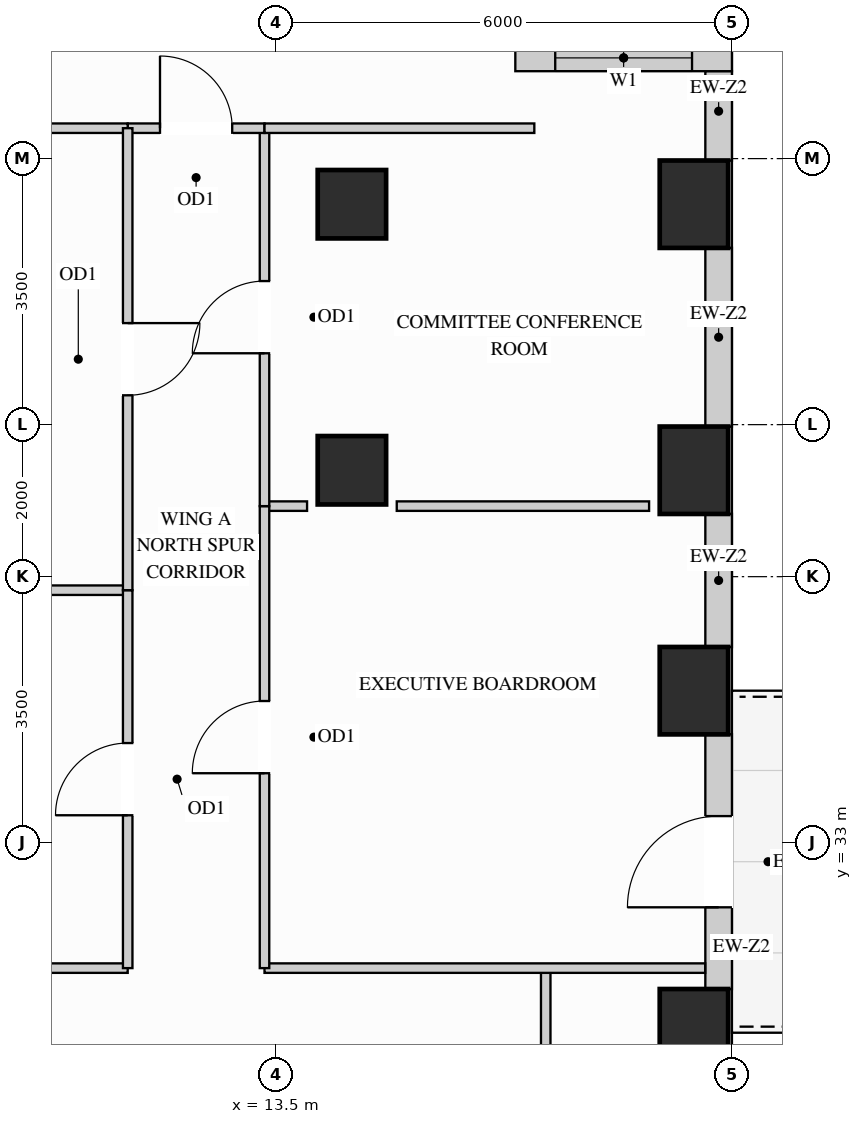
"""IFC4 building model, lengths in metres.
Left out: names, types, materials, properties, quantities, classifications, styles, units other than length and angle.
Written with IfcOpenShell. Run it as: python <this file> out.ifc"""

import sys

from ifc_helpers import new_model, si_unit, direction, frame, frame_2d, origin, origin_2d, place, context, subcontext, project, spatial, rectangle, extrude, source, transform, mapped, element, fill, save


model = new_model("IFC4")
c1 = context("Model", 3, precision=1e-05, world=origin(), true_north=direction((0.0, 1.0)))
c2 = subcontext(c1, "Body", "Model", "MODEL_VIEW")
j1 = project(units=[si_unit("LENGTHUNIT", "METRE"), si_unit("PLANEANGLEUNIT", "RADIAN")], contexts=[c1])
p1 = place(None, origin())
s1 = spatial("IfcSite", under=j1, at=p1, CompositionType="ELEMENT")
p2 = place(p1, origin())
s2 = spatial("IfcBuilding", under=s1, at=p2, CompositionType="ELEMENT")
p3 = place(p2, frame((0.0, 0.0, 113.4)))
s3 = spatial("IfcBuildingStorey", under=s2, at=p3, CompositionType="ELEMENT", Elevation=113.4)
m1 = source(origin(), c2, "Body", "SweptSolid", [
    extrude(rectangle(XDim=0.9, YDim=0.9, at=origin_2d()), origin(), (0.0, 0.0, 1.0), 3.38),
])
for number, where, z_axis, x_axis in (
    (1, (14.5, 37.9, 0.0), (0.0, 0.0, 1.0), (1.0, 0.0, 0.0)),
    (2, (14.5, 41.4, 0.0), (0.0, 0.0, 1.0), (1.0, 0.0, 0.0)),
):
    element("IfcColumn", number, at=place(p3, frame(where, z_axis=z_axis, x_axis=x_axis)), inside=s3, PredefinedType="COLUMN", context=c2, shape_type="MappedRepresentation", body=[
        mapped(m1, transform((0.0, 0.0, 0.0), x_axis=(1.0, 0.0, 0.0), y_axis=(0.0, 1.0, 0.0), z_axis=(0.0, 0.0, 1.0))),
    ])
m2 = source(origin(), c2, "Body", "SweptSolid", [
    extrude(rectangle(XDim=0.9, YDim=1.15, at=origin_2d()), origin(), (0.0, 0.0, 1.0), 3.38),
])
for number, where, z_axis, x_axis in (
    (3, (19.0, 30.5, 0.0), (0.0, 0.0, 1.0), (1.0, 0.0, 0.0)),
    (4, (19.0, 35.0, 0.0), (0.0, 0.0, 1.0), (1.0, 0.0, 0.0)),
    (5, (19.0, 37.9, 0.0), (0.0, 0.0, 1.0), (1.0, 0.0, 0.0)),
    (6, (19.0, 41.4, 0.0), (0.0, 0.0, 1.0), (1.0, 0.0, 0.0)),
):
    element("IfcColumn", number, at=place(p3, frame(where, z_axis=z_axis, x_axis=x_axis)), inside=s3, PredefinedType="COLUMN", context=c2, shape_type="MappedRepresentation", body=[
        mapped(m2, transform((0.0, 0.0, 0.0), x_axis=(1.0, 0.0, 0.0), y_axis=(0.0, 1.0, 0.0), z_axis=(0.0, 0.0, 1.0))),
    ])
p4 = place(p3, frame((19.325, 31.073, 0.0), z_axis=(0.0, 0.0, 1.0), x_axis=(0.0, 1.0, 0.0)))
e7 = element("IfcWall", 7, at=p4, inside=s3, PredefinedType="SOLIDWALL", context=c2, shape_type="SweptSolid", body=[
    extrude(rectangle(XDim=3.354, YDim=0.35, at=frame_2d((1.677, 0.0))), origin(), (0.0, 0.0, 1.0), 2.519),
])
p5 = place(p4, frame((1.077, 0.0, 0.0)))
e8 = element("IfcOpeningElement", 8, at=p5, cuts=e7, PredefinedType="OPENING", context=c2, shape_type="SweptSolid", body=[
    extrude(rectangle(XDim=1.2, YDim=2.15, at=frame_2d((0.6, 1.075))), frame((0.0, 0.185, 0.0), z_axis=(0.0, -1.0, 0.0), x_axis=(1.0, 0.0, 0.0)), (0.0, 0.0, 1.0), 0.37),
])
m3 = source(origin(), c2, "Body", "SweptSolid", [
    extrude(rectangle(XDim=1.754, YDim=0.35, at=frame_2d((0.877, 0.0))), origin(), (0.0, 0.0, 1.0), 2.519),
])
p6 = place(p3, frame((19.325, 35.573, 0.0), z_axis=(0.0, 0.0, 1.0), x_axis=(0.0, 1.0, 0.0)))
e9 = element("IfcWall", 9, at=p6, inside=s3, PredefinedType="SOLIDWALL", context=c2, shape_type="MappedRepresentation", body=[
    mapped(m3, transform((0.0, 0.0, 0.0), x_axis=(1.0, 0.0, 0.0), y_axis=(0.0, 1.0, 0.0), z_axis=(0.0, 0.0, 1.0))),
])
m4 = source(origin(), c2, "Body", "SweptSolid", [
    extrude(rectangle(XDim=2.354, YDim=0.35, at=frame_2d((1.177, 0.0))), origin(), (0.0, 0.0, 1.0), 2.519),
])
p7 = place(p3, frame((19.325, 38.473, 0.0), z_axis=(0.0, 0.0, 1.0), x_axis=(0.0, 1.0, 0.0)))
e10 = element("IfcWall", 10, at=p7, inside=s3, PredefinedType="SOLIDWALL", context=c2, shape_type="MappedRepresentation", body=[
    mapped(m4, transform((0.0, 0.0, 0.0), x_axis=(1.0, 0.0, 0.0), y_axis=(0.0, 1.0, 0.0), z_axis=(0.0, 0.0, 1.0))),
])
m5 = source(origin(), c2, "Body", "SweptSolid", [
    extrude(rectangle(XDim=1.179, YDim=0.35, at=frame_2d((0.59, 0.0))), origin(), (0.0, 0.0, 1.0), 3.365),
])
p8 = place(p3, frame((19.325, 41.973, 0.0), z_axis=(0.0, 0.0, 1.0), x_axis=(0.0, 1.0, 0.0)))
e11 = element("IfcWall", 11, at=p8, inside=s3, PredefinedType="SOLIDWALL", context=c2, shape_type="MappedRepresentation", body=[
    mapped(m5, transform((0.0, 0.0, 0.0), x_axis=(1.0, 0.0, 0.0), y_axis=(0.0, 1.0, 0.0), z_axis=(0.0, 0.0, 1.0))),
])
p9 = place(p3, frame((19.5, 43.325, 0.0), z_axis=(0.0, 0.0, 1.0), x_axis=(-1.0, 0.0, 0.0)))
e12 = element("IfcWall", 12, at=p9, inside=s3, PredefinedType="SOLIDWALL", context=c2, shape_type="SweptSolid", body=[
    extrude(rectangle(XDim=2.85, YDim=0.35, at=frame_2d((1.425, 0.0))), origin(), (0.0, 0.0, 1.0), 3.365),
])
p10 = place(p9, frame((0.525, 0.0, 0.78)))
e13 = element("IfcOpeningElement", 13, at=p10, cuts=e12, PredefinedType="OPENING", context=c2, shape_type="SweptSolid", body=[
    extrude(rectangle(XDim=1.8, YDim=2.1, at=frame_2d((0.9, 1.05))), frame((0.0, 0.185, 0.0), z_axis=(0.0, -1.0, 0.0), x_axis=(1.0, 0.0, 0.0)), (0.0, 0.0, 1.0), 0.37),
])
p11 = place(p3, frame((17.05, 26.05, 0.0), z_axis=(0.0, 0.0, 1.0), x_axis=(0.0, 1.0, 0.0)))
e14 = element("IfcWall", 14, at=p11, inside=s3, PredefinedType="PARTITIONING", context=c2, shape_type="SweptSolid", body=[
    extrude(rectangle(XDim=5.3, YDim=0.125, at=frame_2d((2.65, 0.0))), origin(), (0.0, 0.0, 1.0), 3.365),
])
p12 = place(p11, frame((2.175, 0.0, 0.0)))
e15 = element("IfcOpeningElement", 15, at=p12, cuts=e14, PredefinedType="OPENING", context=c2, shape_type="SweptSolid", body=[
    extrude(rectangle(XDim=0.95, YDim=2.15, at=frame_2d((0.475, 1.075))), frame((0.0, 0.073, 0.0), z_axis=(0.0, -1.0, 0.0), x_axis=(1.0, 0.0, 0.0)), (0.0, 0.0, 1.0), 0.145),
])
m6 = source(origin(), c2, "Body", "SweptSolid", [
    extrude(rectangle(XDim=0.56, YDim=0.125, at=frame_2d((0.28, 0.0))), origin(), (0.0, 0.0, 1.0), 3.365),
])
p13 = place(p3, frame((13.35, 37.428, 0.0), z_axis=(0.0, 0.0, 1.0), x_axis=(1.0, 0.0, 0.0)))
e16 = element("IfcWall", 16, at=p13, inside=s3, PredefinedType="PARTITIONING", context=c2, shape_type="MappedRepresentation", body=[
    mapped(m6, transform((0.0, 0.0, 0.0), x_axis=(1.0, 0.0, 0.0), y_axis=(0.0, 1.0, 0.0), z_axis=(0.0, 0.0, 1.0))),
])
m7 = source(origin(), c2, "Body", "SweptSolid", [
    extrude(rectangle(XDim=3.32, YDim=0.125, at=frame_2d((1.66, 0.0))), origin(), (0.0, 0.0, 1.0), 3.365),
])
p14 = place(p3, frame((15.09, 37.428, 0.0), z_axis=(0.0, 0.0, 1.0), x_axis=(1.0, 0.0, 0.0)))
e17 = element("IfcWall", 17, at=p14, inside=s3, PredefinedType="PARTITIONING", context=c2, shape_type="MappedRepresentation", body=[
    mapped(m7, transform((0.0, 0.0, 0.0), x_axis=(1.0, 0.0, 0.0), y_axis=(0.0, 1.0, 0.0), z_axis=(0.0, 0.0, 1.0))),
])
m8 = source(origin(), c2, "Body", "SweptSolid", [
    extrude(rectangle(XDim=5.798, YDim=0.125, at=frame_2d((2.899, 0.0))), origin(), (0.0, 0.0, 1.0), 3.365),
])
p15 = place(p3, frame((13.35, 31.35, 0.0), z_axis=(0.0, 0.0, 1.0), x_axis=(1.0, 0.0, 0.0)))
e18 = element("IfcWall", 18, at=p15, inside=s3, PredefinedType="PARTITIONING", context=c2, shape_type="MappedRepresentation", body=[
    mapped(m8, transform((0.0, 0.0, 0.0), x_axis=(1.0, 0.0, 0.0), y_axis=(0.0, 1.0, 0.0), z_axis=(0.0, 0.0, 1.0))),
])
m9 = source(origin(), c2, "Body", "SweptSolid", [
    extrude(rectangle(XDim=11.198, YDim=0.125, at=frame_2d((5.599, 0.0))), origin(), (0.0, 0.0, 1.0), 3.365),
])
p16 = place(p3, frame((0.352, 31.35, 0.0), z_axis=(0.0, 0.0, 1.0), x_axis=(1.0, 0.0, 0.0)))
e19 = element("IfcWall", 19, at=p16, inside=s3, PredefinedType="PARTITIONING", context=c2, shape_type="MappedRepresentation", body=[
    mapped(m9, transform((0.0, 0.0, 0.0), x_axis=(1.0, 0.0, 0.0), y_axis=(0.0, 1.0, 0.0), z_axis=(0.0, 0.0, 1.0))),
])
m10 = source(origin(), c2, "Body", "SweptSolid", [
    extrude(rectangle(XDim=11.198, YDim=0.125, at=frame_2d((5.599, 0.0))), origin(), (0.0, 0.0, 1.0), 2.828),
])
p17 = place(p3, frame((0.352, 36.322, 0.0), z_axis=(0.0, 0.0, 1.0), x_axis=(1.0, 0.0, 0.0)))
e20 = element("IfcWall", 20, at=p17, inside=s3, PredefinedType="PARTITIONING", context=c2, shape_type="MappedRepresentation", body=[
    mapped(m10, transform((0.0, 0.0, 0.0), x_axis=(1.0, 0.0, 0.0), y_axis=(0.0, 1.0, 0.0), z_axis=(0.0, 0.0, 1.0))),
])
p18 = place(p3, frame((13.35, 31.35, 0.0), z_axis=(0.0, 0.0, 1.0), x_axis=(0.0, 1.0, 0.0)))
e21 = element("IfcWall", 21, at=p18, inside=s3, PredefinedType="PARTITIONING", context=c2, shape_type="SweptSolid", body=[
    extrude(rectangle(XDim=6.078, YDim=0.125, at=frame_2d((3.039, 0.0))), origin(), (0.0, 0.0, 1.0), 3.365),
])
p19 = place(p18, frame((2.564, 0.0, 0.0)))
e22 = element("IfcOpeningElement", 22, at=p19, cuts=e21, PredefinedType="OPENING", context=c2, shape_type="SweptSolid", body=[
    extrude(rectangle(XDim=0.95, YDim=2.15, at=frame_2d((0.475, 1.075))), frame((0.0, 0.073, 0.0), z_axis=(0.0, -1.0, 0.0), x_axis=(1.0, 0.0, 0.0)), (0.0, 0.0, 1.0), 0.145),
])
p20 = place(p3, frame((13.35, 37.428, 0.0), z_axis=(0.0, 0.0, 1.0), x_axis=(0.0, 1.0, 0.0)))
e23 = element("IfcWall", 23, at=p20, inside=s3, PredefinedType="PARTITIONING", context=c2, shape_type="SweptSolid", body=[
    extrude(rectangle(XDim=4.972, YDim=0.125, at=frame_2d((2.486, 0.0))), origin(), (0.0, 0.0, 1.0), 3.365),
])
p21 = place(p20, frame((2.011, 0.0, 0.0)))
e24 = element("IfcOpeningElement", 24, at=p21, cuts=e23, PredefinedType="OPENING", context=c2, shape_type="SweptSolid", body=[
    extrude(rectangle(XDim=0.95, YDim=2.15, at=frame_2d((0.475, 1.075))), frame((0.0, 0.073, 0.0), z_axis=(0.0, -1.0, 0.0), x_axis=(1.0, 0.0, 0.0)), (0.0, 0.0, 1.0), 0.145),
])
p22 = place(p3, frame((11.55, 42.4, 0.0), z_axis=(0.0, 0.0, 1.0), x_axis=(1.0, 0.0, 0.0)))
e25 = element("IfcWall", 25, at=p22, inside=s3, PredefinedType="PARTITIONING", context=c2, shape_type="SweptSolid", body=[
    extrude(rectangle(XDim=1.8, YDim=0.125, at=frame_2d((0.9, 0.0))), origin(), (0.0, 0.0, 1.0), 3.365),
])
p23 = place(p22, frame((0.425, 0.0, 0.0)))
e26 = element("IfcOpeningElement", 26, at=p23, cuts=e25, PredefinedType="OPENING", context=c2, shape_type="SweptSolid", body=[
    extrude(rectangle(XDim=0.95, YDim=2.15, at=frame_2d((0.475, 1.075))), frame((0.0, 0.073, 0.0), z_axis=(0.0, -1.0, 0.0), x_axis=(1.0, 0.0, 0.0)), (0.0, 0.0, 1.0), 0.145),
])
m11 = source(origin(), c2, "Body", "SweptSolid", [
    extrude(rectangle(XDim=3.55, YDim=0.125, at=frame_2d((1.775, 0.0))), origin(), (0.0, 0.0, 1.0), 3.365),
])
p24 = place(p3, frame((13.35, 42.4, 0.0), z_axis=(0.0, 0.0, 1.0), x_axis=(1.0, 0.0, 0.0)))
e27 = element("IfcWall", 27, at=p24, inside=s3, PredefinedType="PARTITIONING", context=c2, shape_type="MappedRepresentation", body=[
    mapped(m11, transform((0.0, 0.0, 0.0), x_axis=(1.0, 0.0, 0.0), y_axis=(0.0, 1.0, 0.0), z_axis=(0.0, 0.0, 1.0))),
])
m12 = source(origin(), c2, "Body", "SweptSolid", [
    extrude(rectangle(XDim=8.95, YDim=0.125, at=frame_2d((4.475, 0.0))), origin(), (0.0, 0.0, 1.0), 3.365),
])
p25 = place(p3, frame((2.6, 42.4, 0.0), z_axis=(0.0, 0.0, 1.0), x_axis=(1.0, 0.0, 0.0)))
e28 = element("IfcWall", 28, at=p25, inside=s3, PredefinedType="PARTITIONING", context=c2, shape_type="MappedRepresentation", body=[
    mapped(m12, transform((0.0, 0.0, 0.0), x_axis=(1.0, 0.0, 0.0), y_axis=(0.0, 1.0, 0.0), z_axis=(0.0, 0.0, 1.0))),
])
p26 = place(p3, frame((11.55, 31.35, 0.0), z_axis=(0.0, 0.0, 1.0), x_axis=(0.0, 1.0, 0.0)))
e29 = element("IfcWall", 29, at=p26, inside=s3, PredefinedType="PARTITIONING", context=c2, shape_type="SweptSolid", body=[
    extrude(rectangle(XDim=4.972, YDim=0.125, at=frame_2d((2.486, 0.0))), origin(), (0.0, 0.0, 1.0), 3.365),
])
p27 = place(p26, frame((2.011, 0.0, 0.0)))
e30 = element("IfcOpeningElement", 30, at=p27, cuts=e29, PredefinedType="OPENING", context=c2, shape_type="SweptSolid", body=[
    extrude(rectangle(XDim=0.95, YDim=2.15, at=frame_2d((0.475, 1.075))), frame((0.0, 0.073, 0.0), z_axis=(0.0, -1.0, 0.0), x_axis=(1.0, 0.0, 0.0)), (0.0, 0.0, 1.0), 0.145),
])
p28 = place(p3, frame((11.55, 36.322, 0.0), z_axis=(0.0, 0.0, 1.0), x_axis=(0.0, 1.0, 0.0)))
e31 = element("IfcWall", 31, at=p28, inside=s3, PredefinedType="PARTITIONING", context=c2, shape_type="SweptSolid", body=[
    extrude(rectangle(XDim=6.078, YDim=0.125, at=frame_2d((3.039, 0.0))), origin(), (0.0, 0.0, 1.0), 3.365),
])
p29 = place(p28, frame((2.564, 0.0, 0.0)))
e32 = element("IfcOpeningElement", 32, at=p29, cuts=e31, PredefinedType="OPENING", context=c2, shape_type="SweptSolid", body=[
    extrude(rectangle(XDim=0.95, YDim=2.15, at=frame_2d((0.475, 1.075))), frame((0.0, 0.073, 0.0), z_axis=(0.0, -1.0, 0.0), x_axis=(1.0, 0.0, 0.0)), (0.0, 0.0, 1.0), 0.145),
])
m13 = source(origin(), c2, "Body", "SweptSolid", [
    extrude(rectangle(XDim=1.2, YDim=2.15, at=frame_2d((0.6, 1.075))), frame((0.0, 0.025, 0.0), z_axis=(0.0, -1.0, 0.0), x_axis=(1.0, 0.0, 0.0)), (0.0, 0.0, 1.0), 0.05),
])
p30 = place(p5, frame((1.2, 0.0, 0.0), z_axis=(0.0, 0.0, 1.0), x_axis=(-1.0, 0.0, 0.0)))
e33 = element("IfcDoor", 33, at=p30, inside=s3, OperationType="SINGLE_SWING_LEFT", PredefinedType="DOOR", context=c2, shape_type="MappedRepresentation", body=[
    mapped(m13, transform((0.0, 0.0, 0.0), x_axis=(1.0, 0.0, 0.0), y_axis=(0.0, 1.0, 0.0), z_axis=(0.0, 0.0, 1.0))),
])
fill(e8, e33)
m14 = source(origin(), c2, "Body", "SweptSolid", [
    extrude(rectangle(XDim=0.95, YDim=2.15, at=frame_2d((0.475, 1.075))), frame((0.0, 0.025, 0.0), z_axis=(0.0, -1.0, 0.0), x_axis=(1.0, 0.0, 0.0)), (0.0, 0.0, 1.0), 0.05),
])
p31 = place(p19, origin())
e34 = element("IfcDoor", 34, at=p31, inside=s3, OperationType="SINGLE_SWING_LEFT", PredefinedType="DOOR", context=c2, shape_type="MappedRepresentation", body=[
    mapped(m14, transform((0.0, 0.0, 0.0), x_axis=(1.0, 0.0, 0.0), y_axis=(0.0, 1.0, 0.0), z_axis=(0.0, 0.0, 1.0))),
])
fill(e22, e34)
p32 = place(p21, origin())
e35 = element("IfcDoor", 35, at=p32, inside=s3, OperationType="SINGLE_SWING_LEFT", PredefinedType="DOOR", context=c2, shape_type="MappedRepresentation", body=[
    mapped(m14, transform((0.0, 0.0, 0.0), x_axis=(1.0, 0.0, 0.0), y_axis=(0.0, 1.0, 0.0), z_axis=(0.0, 0.0, 1.0))),
])
fill(e24, e35)
p33 = place(p23, origin())
e36 = element("IfcDoor", 36, at=p33, inside=s3, OperationType="SINGLE_SWING_LEFT", PredefinedType="DOOR", context=c2, shape_type="MappedRepresentation", body=[
    mapped(m14, transform((0.0, 0.0, 0.0), x_axis=(1.0, 0.0, 0.0), y_axis=(0.0, 1.0, 0.0), z_axis=(0.0, 0.0, 1.0))),
])
fill(e26, e36)
p34 = place(p27, origin())
e37 = element("IfcDoor", 37, at=p34, inside=s3, OperationType="SINGLE_SWING_LEFT", PredefinedType="DOOR", context=c2, shape_type="MappedRepresentation", body=[
    mapped(m14, transform((0.0, 0.0, 0.0), x_axis=(1.0, 0.0, 0.0), y_axis=(0.0, 1.0, 0.0), z_axis=(0.0, 0.0, 1.0))),
])
fill(e30, e37)
p35 = place(p29, origin())
e38 = element("IfcDoor", 38, at=p35, inside=s3, OperationType="SINGLE_SWING_RIGHT", PredefinedType="DOOR", context=c2, shape_type="MappedRepresentation", body=[
    mapped(m14, transform((0.0, 0.0, 0.0), x_axis=(1.0, 0.0, 0.0), y_axis=(0.0, 1.0, 0.0), z_axis=(0.0, 0.0, 1.0))),
])
fill(e32, e38)
m15 = source(origin(), c2, "Body", "SweptSolid", [
    extrude(rectangle(XDim=1.8, YDim=2.1, at=frame_2d((0.9, 1.05))), frame((0.0, 0.03, 0.0), z_axis=(0.0, -1.0, 0.0), x_axis=(1.0, 0.0, 0.0)), (0.0, 0.0, 1.0), 0.06),
])
p36 = place(p10, origin())
e39 = element("IfcWindow", 39, at=p36, inside=s3, PartitioningType="SINGLE_PANEL", PredefinedType="WINDOW", context=c2, shape_type="MappedRepresentation", body=[
    mapped(m15, transform((0.0, 0.0, 0.0), x_axis=(1.0, 0.0, 0.0), y_axis=(0.0, 1.0, 0.0), z_axis=(0.0, 0.0, 1.0))),
])
fill(e13, e39)
save(model, sys.argv[1])
